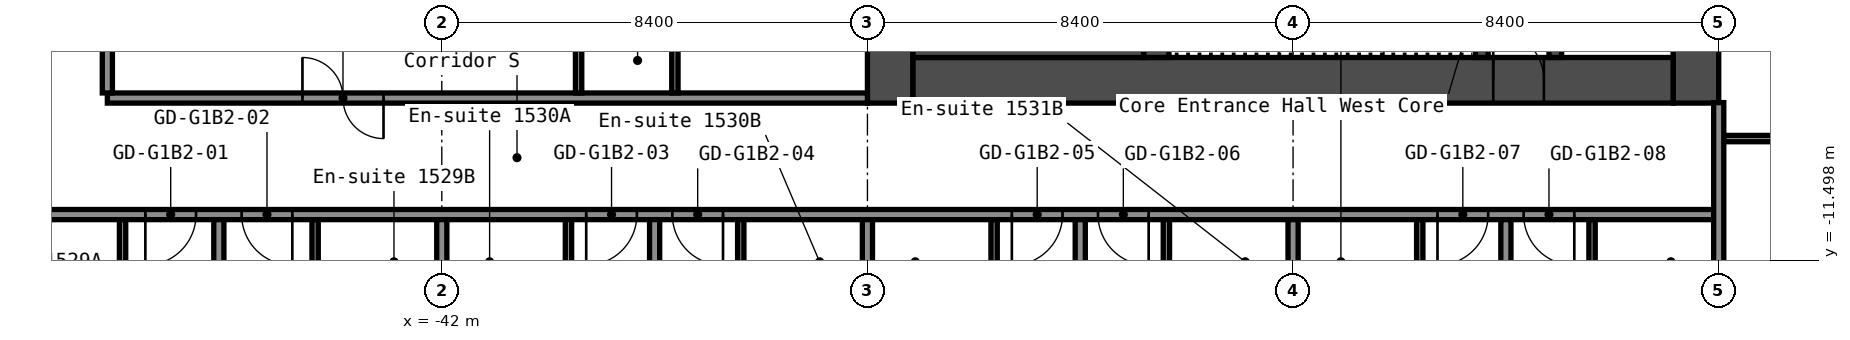
"""IFC4 building model, lengths in metres.
Left out: names, types, materials, properties, quantities, classifications, styles, units other than length and angle.
Written with IfcOpenShell. Run it as: python <this file> out.ifc"""

import sys

from ifc_helpers import new_model, si_unit, direction, frame, frame_2d, origin, place, context, subcontext, project, spatial, rectangle, extrude, element, fill, save


model = new_model("IFC4")
c1 = context("Model", 3, precision=1e-05, world=origin(), true_north=direction((0.0, 1.0)))
c2 = subcontext(c1, "Body", "Model", "MODEL_VIEW")
j1 = project(units=[si_unit("LENGTHUNIT", "METRE"), si_unit("PLANEANGLEUNIT", "RADIAN")], contexts=[c1])
p1 = place(None, origin())
s1 = spatial("IfcSite", under=j1, at=p1, CompositionType="ELEMENT")
p2 = place(p1, origin())
s2 = spatial("IfcBuilding", under=s1, at=p2, CompositionType="ELEMENT")
p3 = place(p2, frame((0.0, 0.0, 55.0)))
s3 = spatial("IfcBuildingStorey", under=s2, at=p3, CompositionType="ELEMENT", Elevation=55.0)
p4 = place(p3, frame((-17.25, -8.4, 0.0), z_axis=(0.0, 0.0, 1.0), x_axis=(0.0, 1.0, 0.0)))
e1 = element("IfcWall", 1, at=p4, inside=s3, PredefinedType="SHEAR", context=c2, shape_type="SweptSolid", body=[
    extrude(rectangle(XDim=16.8, YDim=0.9, at=frame_2d((8.4, 0.0))), origin(), (0.0, 0.0, 1.0), 2.8),
])
p5 = place(p4, frame((12.75, 0.0, 0.0)))
e2 = element("IfcOpeningElement", 2, at=p5, cuts=e1, PredefinedType="OPENING", context=c2, shape_type="SweptSolid", body=[
    extrude(rectangle(XDim=1.2, YDim=2.1, at=frame_2d((0.6, 1.05))), frame((0.0, 0.46, 0.0), z_axis=(0.0, -1.0, 0.0), x_axis=(1.0, 0.0, 0.0)), (0.0, 0.0, 1.0), 0.92),
])
p6 = place(p4, frame((2.85, 0.0, 0.0)))
e3 = element("IfcOpeningElement", 3, at=p6, cuts=e1, PredefinedType="OPENING", context=c2, shape_type="SweptSolid", body=[
    extrude(rectangle(XDim=1.2, YDim=2.1, at=frame_2d((0.6, 1.05))), frame((0.0, 0.46, 0.0), z_axis=(0.0, -1.0, 0.0), x_axis=(1.0, 0.0, 0.0)), (0.0, 0.0, 1.0), 0.92),
])
p7 = place(p3, frame((-33.15, -8.4, 0.0), z_axis=(0.0, 0.0, 1.0), x_axis=(0.0, 1.0, 0.0)))
e4 = element("IfcWall", 4, at=p7, inside=s3, PredefinedType="SHEAR", context=c2, shape_type="SweptSolid", body=[
    extrude(rectangle(XDim=16.8, YDim=0.9, at=frame_2d((8.4, 0.0))), origin(), (0.0, 0.0, 1.0), 2.8),
])
p8 = place(p3, frame((-32.7, -7.95, 0.0), z_axis=(0.0, 0.0, 1.0), x_axis=(1.0, 0.0, 0.0)))
e5 = element("IfcWall", 5, at=p8, inside=s3, PredefinedType="SHEAR", context=c2, shape_type="SweptSolid", body=[
    extrude(rectangle(XDim=15.0, YDim=0.9, at=frame_2d((7.5, 0.0))), origin(), (0.0, 0.0, 1.0), 2.8),
])
p9 = place(p8, frame((11.45, 0.0, 0.0)))
e6 = element("IfcOpeningElement", 6, at=p9, cuts=e5, PredefinedType="OPENING", context=c2, shape_type="SweptSolid", body=[
    extrude(rectangle(XDim=1.0, YDim=2.1, at=frame_2d((0.5, 1.05))), frame((0.0, 0.46, 0.0), z_axis=(0.0, -1.0, 0.0), x_axis=(1.0, 0.0, 0.0)), (0.0, 0.0, 1.0), 0.92),
])
p10 = place(p3, frame((-20.025, -7.5, 0.0), z_axis=(0.0, 0.0, 1.0), x_axis=(0.0, 1.0, 0.0)))
e7 = element("IfcWall", 7, at=p10, inside=s3, PredefinedType="SHEAR", context=c2, shape_type="SweptSolid", body=[
    extrude(rectangle(XDim=6.3, YDim=0.25, at=frame_2d((3.15, 0.0))), origin(), (0.0, 0.0, 1.0), 2.8),
])
p11 = place(p10, frame((2.4, 0.0, 0.0)))
e8 = element("IfcOpeningElement", 8, at=p11, cuts=e7, PredefinedType="OPENING", context=c2, shape_type="SweptSolid", body=[
    extrude(rectangle(XDim=1.0, YDim=2.1, at=frame_2d((0.5, 1.05))), frame((0.0, 0.135, 0.0), z_axis=(0.0, -1.0, 0.0), x_axis=(1.0, 0.0, 0.0)), (0.0, 0.0, 1.0), 0.27),
])
p12 = place(p3, frame((-21.475, -7.5, 0.0), z_axis=(0.0, 0.0, 1.0), x_axis=(0.0, 1.0, 0.0)))
e9 = element("IfcWall", 9, at=p12, inside=s3, PredefinedType="SHEAR", context=c2, shape_type="SweptSolid", body=[
    extrude(rectangle(XDim=3.75, YDim=0.25, at=frame_2d((1.875, 0.0))), origin(), (0.0, 0.0, 1.0), 2.8),
])
p13 = place(p12, frame((1.3, 0.0, 0.0)))
e10 = element("IfcOpeningElement", 10, at=p13, cuts=e9, PredefinedType="OPENING", context=c2, shape_type="SweptSolid", body=[
    extrude(rectangle(XDim=1.2, YDim=2.1, at=frame_2d((0.6, 1.05))), frame((0.0, 0.135, 0.0), z_axis=(0.0, -1.0, 0.0), x_axis=(1.0, 0.0, 0.0)), (0.0, 0.0, 1.0), 0.27),
])
p14 = place(p3, frame((-27.9, -7.5, 0.0), z_axis=(0.0, 0.0, 1.0), x_axis=(0.0, 1.0, 0.0)))
e11 = element("IfcWall", 11, at=p14, inside=s3, PredefinedType="SHEAR", context=c2, shape_type="SweptSolid", body=[
    extrude(rectangle(XDim=3.75, YDim=0.5, at=frame_2d((1.875, 0.0))), origin(), (0.0, 0.0, 1.0), 2.8),
])
p15 = place(p3, frame((-32.7, -6.75, 0.0), z_axis=(0.0, 0.0, 1.0), x_axis=(1.0, 0.0, 0.0)))
e12 = element("IfcWall", 12, at=p15, inside=s3, PredefinedType="SHEAR", context=c2, shape_type="SweptSolid", body=[
    extrude(rectangle(XDim=4.55, YDim=1.5, at=frame_2d((2.275, 0.0))), origin(), (0.0, 0.0, 1.0), 2.8),
])
p16 = place(p3, frame((-51.1, -10.6, 0.0), z_axis=(0.0, 0.0, 1.0), x_axis=(1.0, 0.0, 0.0)))
e13 = element("IfcWall", 13, at=p16, inside=s3, PredefinedType="PARTITIONING", context=c2, shape_type="SweptSolid", body=[
    extrude(rectangle(XDim=34.3, YDim=0.2, at=frame_2d((17.15, 0.0))), origin(), (0.0, 0.0, 1.0), 2.8),
])
p17 = place(p16, frame((3.25, 0.0, 0.0)))
e14 = element("IfcOpeningElement", 14, at=p17, cuts=e13, PredefinedType="OPENING", context=c2, shape_type="SweptSolid", body=[
    extrude(rectangle(XDim=1.0, YDim=2.1, at=frame_2d((0.5, 1.05))), frame((0.0, 0.11, 0.0), z_axis=(0.0, -1.0, 0.0), x_axis=(1.0, 0.0, 0.0)), (0.0, 0.0, 1.0), 0.22),
])
p18 = place(p16, frame((5.15, 0.0, 0.0)))
e15 = element("IfcOpeningElement", 15, at=p18, cuts=e13, PredefinedType="OPENING", context=c2, shape_type="SweptSolid", body=[
    extrude(rectangle(XDim=1.0, YDim=2.1, at=frame_2d((0.5, 1.05))), frame((0.0, 0.11, 0.0), z_axis=(0.0, -1.0, 0.0), x_axis=(1.0, 0.0, 0.0)), (0.0, 0.0, 1.0), 0.22),
])
p19 = place(p16, frame((11.95, 0.0, 0.0)))
e16 = element("IfcOpeningElement", 16, at=p19, cuts=e13, PredefinedType="OPENING", context=c2, shape_type="SweptSolid", body=[
    extrude(rectangle(XDim=1.0, YDim=2.1, at=frame_2d((0.5, 1.05))), frame((0.0, 0.11, 0.0), z_axis=(0.0, -1.0, 0.0), x_axis=(1.0, 0.0, 0.0)), (0.0, 0.0, 1.0), 0.22),
])
p20 = place(p16, frame((13.65, 0.0, 0.0)))
e17 = element("IfcOpeningElement", 17, at=p20, cuts=e13, PredefinedType="OPENING", context=c2, shape_type="SweptSolid", body=[
    extrude(rectangle(XDim=1.0, YDim=2.1, at=frame_2d((0.5, 1.05))), frame((0.0, 0.11, 0.0), z_axis=(0.0, -1.0, 0.0), x_axis=(1.0, 0.0, 0.0)), (0.0, 0.0, 1.0), 0.22),
])
p21 = place(p16, frame((20.35, 0.0, 0.0)))
e18 = element("IfcOpeningElement", 18, at=p21, cuts=e13, PredefinedType="OPENING", context=c2, shape_type="SweptSolid", body=[
    extrude(rectangle(XDim=1.0, YDim=2.1, at=frame_2d((0.5, 1.05))), frame((0.0, 0.11, 0.0), z_axis=(0.0, -1.0, 0.0), x_axis=(1.0, 0.0, 0.0)), (0.0, 0.0, 1.0), 0.22),
])
p22 = place(p16, frame((22.05, 0.0, 0.0)))
e19 = element("IfcOpeningElement", 19, at=p22, cuts=e13, PredefinedType="OPENING", context=c2, shape_type="SweptSolid", body=[
    extrude(rectangle(XDim=1.0, YDim=2.1, at=frame_2d((0.5, 1.05))), frame((0.0, 0.11, 0.0), z_axis=(0.0, -1.0, 0.0), x_axis=(1.0, 0.0, 0.0)), (0.0, 0.0, 1.0), 0.22),
])
p23 = place(p16, frame((28.75, 0.0, 0.0)))
e20 = element("IfcOpeningElement", 20, at=p23, cuts=e13, PredefinedType="OPENING", context=c2, shape_type="SweptSolid", body=[
    extrude(rectangle(XDim=1.0, YDim=2.1, at=frame_2d((0.5, 1.05))), frame((0.0, 0.11, 0.0), z_axis=(0.0, -1.0, 0.0), x_axis=(1.0, 0.0, 0.0)), (0.0, 0.0, 1.0), 0.22),
])
p24 = place(p16, frame((30.45, 0.0, 0.0)))
e21 = element("IfcOpeningElement", 21, at=p24, cuts=e13, PredefinedType="OPENING", context=c2, shape_type="SweptSolid", body=[
    extrude(rectangle(XDim=1.0, YDim=2.1, at=frame_2d((0.5, 1.05))), frame((0.0, 0.11, 0.0), z_axis=(0.0, -1.0, 0.0), x_axis=(1.0, 0.0, 0.0)), (0.0, 0.0, 1.0), 0.22),
])
p25 = place(p3, frame((-16.7, -9.1, 0.0), z_axis=(0.0, 0.0, 1.0), x_axis=(1.0, 0.0, 0.0)))
e22 = element("IfcWall", 22, at=p25, inside=s3, PredefinedType="PARTITIONING", context=c2, shape_type="SweptSolid", body=[
    extrude(rectangle(XDim=2.337, YDim=0.125, at=frame_2d((1.169, 0.0))), origin(), (0.0, 0.0, 1.0), 2.8),
])
p26 = place(p3, frame((-48.6, -8.3, 0.0), z_axis=(0.0, 0.0, 1.0), x_axis=(1.0, 0.0, 0.0)))
e23 = element("IfcWall", 23, at=p26, inside=s3, PredefinedType="PARTITIONING", context=c2, shape_type="SweptSolid", body=[
    extrude(rectangle(XDim=15.0, YDim=0.2, at=frame_2d((7.5, 0.0))), origin(), (0.0, 0.0, 1.0), 2.8),
])
p27 = place(p26, frame((3.85, 0.0, 0.0)))
e24 = element("IfcOpeningElement", 24, at=p27, cuts=e23, PredefinedType="OPENING", context=c2, shape_type="SweptSolid", body=[
    extrude(rectangle(XDim=1.6, YDim=2.1, at=frame_2d((0.8, 1.05))), frame((0.0, 0.11, 0.0), z_axis=(0.0, -1.0, 0.0), x_axis=(1.0, 0.0, 0.0)), (0.0, 0.0, 1.0), 0.22),
])
p28 = place(p3, frame((-48.6, -8.2, 0.0), z_axis=(0.0, 0.0, 1.0), x_axis=(0.0, 1.0, 0.0)))
e25 = element("IfcWall", 25, at=p28, inside=s3, PredefinedType="PARTITIONING", context=c2, shape_type="SweptSolid", body=[
    extrude(rectangle(XDim=16.4, YDim=0.2, at=frame_2d((8.2, 0.0))), origin(), (0.0, 0.0, 1.0), 2.8),
])
p29 = place(p3, frame((-48.3, -13.6, 0.0), z_axis=(0.0, 0.0, 1.0), x_axis=(0.0, 1.0, 0.0)))
e26 = element("IfcWall", 26, at=p29, inside=s3, PredefinedType="PARTITIONING", context=c2, shape_type="SweptSolid", body=[
    extrude(rectangle(XDim=2.9, YDim=0.125, at=frame_2d((1.45, 0.0))), origin(), (0.0, 0.0, 1.0), 2.8),
])
p30 = place(p29, frame((0.6, 0.0, 0.0)))
e27 = element("IfcOpeningElement", 27, at=p30, cuts=e26, PredefinedType="OPENING", context=c2, shape_type="SweptSolid", body=[
    extrude(rectangle(XDim=0.8, YDim=2.1, at=frame_2d((0.4, 1.05))), frame((0.0, 0.073, 0.0), z_axis=(0.0, -1.0, 0.0), x_axis=(1.0, 0.0, 0.0)), (0.0, 0.0, 1.0), 0.145),
])
p31 = place(p3, frame((-46.4, -20.3, 0.0), z_axis=(0.0, 0.0, 1.0), x_axis=(0.0, 1.0, 0.0)))
e28 = element("IfcWall", 28, at=p31, inside=s3, PredefinedType="PARTITIONING", context=c2, shape_type="SweptSolid", body=[
    extrude(rectangle(XDim=9.6, YDim=0.2, at=frame_2d((4.8, 0.0))), origin(), (0.0, 0.0, 1.0), 2.8),
])
p32 = place(p3, frame((-44.5, -13.6, 0.0), z_axis=(0.0, 0.0, 1.0), x_axis=(0.0, 1.0, 0.0)))
e29 = element("IfcWall", 29, at=p32, inside=s3, PredefinedType="PARTITIONING", context=c2, shape_type="SweptSolid", body=[
    extrude(rectangle(XDim=2.9, YDim=0.125, at=frame_2d((1.45, 0.0))), origin(), (0.0, 0.0, 1.0), 2.8),
])
p33 = place(p32, frame((0.6, 0.0, 0.0)))
e30 = element("IfcOpeningElement", 30, at=p33, cuts=e29, PredefinedType="OPENING", context=c2, shape_type="SweptSolid", body=[
    extrude(rectangle(XDim=0.8, YDim=2.1, at=frame_2d((0.4, 1.05))), frame((0.0, 0.073, 0.0), z_axis=(0.0, -1.0, 0.0), x_axis=(1.0, 0.0, 0.0)), (0.0, 0.0, 1.0), 0.145),
])
p34 = place(p3, frame((-42.0, -20.3, 0.0), z_axis=(0.0, 0.0, 1.0), x_axis=(0.0, 1.0, 0.0)))
e31 = element("IfcWall", 31, at=p34, inside=s3, PredefinedType="PARTITIONING", context=c2, shape_type="SweptSolid", body=[
    extrude(rectangle(XDim=9.6, YDim=0.2, at=frame_2d((4.8, 0.0))), origin(), (0.0, 0.0, 1.0), 2.8),
])
p35 = place(p3, frame((-39.5, -13.6, 0.0), z_axis=(0.0, 0.0, 1.0), x_axis=(0.0, 1.0, 0.0)))
e32 = element("IfcWall", 32, at=p35, inside=s3, PredefinedType="PARTITIONING", context=c2, shape_type="SweptSolid", body=[
    extrude(rectangle(XDim=2.9, YDim=0.125, at=frame_2d((1.45, 0.0))), origin(), (0.0, 0.0, 1.0), 2.8),
])
p36 = place(p35, frame((0.6, 0.0, 0.0)))
e33 = element("IfcOpeningElement", 33, at=p36, cuts=e32, PredefinedType="OPENING", context=c2, shape_type="SweptSolid", body=[
    extrude(rectangle(XDim=0.8, YDim=2.1, at=frame_2d((0.4, 1.05))), frame((0.0, 0.073, 0.0), z_axis=(0.0, -1.0, 0.0), x_axis=(1.0, 0.0, 0.0)), (0.0, 0.0, 1.0), 0.145),
])
p37 = place(p3, frame((-39.3, -8.2, 0.0), z_axis=(0.0, 0.0, 1.0), x_axis=(0.0, 1.0, 0.0)))
e34 = element("IfcWall", 34, at=p37, inside=s3, PredefinedType="PARTITIONING", context=c2, shape_type="SweptSolid", body=[
    extrude(rectangle(XDim=2.3, YDim=0.125, at=frame_2d((1.15, 0.0))), origin(), (0.0, 0.0, 1.0), 2.8),
])
p38 = place(p3, frame((-37.8, -20.3, 0.0), z_axis=(0.0, 0.0, 1.0), x_axis=(0.0, 1.0, 0.0)))
e35 = element("IfcWall", 35, at=p38, inside=s3, PredefinedType="PARTITIONING", context=c2, shape_type="SweptSolid", body=[
    extrude(rectangle(XDim=9.6, YDim=0.2, at=frame_2d((4.8, 0.0))), origin(), (0.0, 0.0, 1.0), 2.8),
])
p39 = place(p3, frame((-37.4, -8.2, 0.0), z_axis=(0.0, 0.0, 1.0), x_axis=(0.0, 1.0, 0.0)))
e36 = element("IfcWall", 36, at=p39, inside=s3, PredefinedType="PARTITIONING", context=c2, shape_type="SweptSolid", body=[
    extrude(rectangle(XDim=3.3, YDim=0.125, at=frame_2d((1.65, 0.0))), origin(), (0.0, 0.0, 1.0), 2.8),
])
p40 = place(p3, frame((-36.1, -13.6, 0.0), z_axis=(0.0, 0.0, 1.0), x_axis=(0.0, 1.0, 0.0)))
e37 = element("IfcWall", 37, at=p40, inside=s3, PredefinedType="PARTITIONING", context=c2, shape_type="SweptSolid", body=[
    extrude(rectangle(XDim=2.9, YDim=0.125, at=frame_2d((1.45, 0.0))), origin(), (0.0, 0.0, 1.0), 2.8),
])
p41 = place(p40, frame((0.6, 0.0, 0.0)))
e38 = element("IfcOpeningElement", 38, at=p41, cuts=e37, PredefinedType="OPENING", context=c2, shape_type="SweptSolid", body=[
    extrude(rectangle(XDim=0.8, YDim=2.1, at=frame_2d((0.4, 1.05))), frame((0.0, 0.073, 0.0), z_axis=(0.0, -1.0, 0.0), x_axis=(1.0, 0.0, 0.0)), (0.0, 0.0, 1.0), 0.145),
])
p42 = place(p3, frame((-33.6, -20.3, 0.0), z_axis=(0.0, 0.0, 1.0), x_axis=(0.0, 1.0, 0.0)))
e39 = element("IfcWall", 39, at=p42, inside=s3, PredefinedType="PARTITIONING", context=c2, shape_type="SweptSolid", body=[
    extrude(rectangle(XDim=9.6, YDim=0.2, at=frame_2d((4.8, 0.0))), origin(), (0.0, 0.0, 1.0), 2.8),
])
p43 = place(p3, frame((-31.1, -13.6, 0.0), z_axis=(0.0, 0.0, 1.0), x_axis=(0.0, 1.0, 0.0)))
e40 = element("IfcWall", 40, at=p43, inside=s3, PredefinedType="PARTITIONING", context=c2, shape_type="SweptSolid", body=[
    extrude(rectangle(XDim=2.9, YDim=0.125, at=frame_2d((1.45, 0.0))), origin(), (0.0, 0.0, 1.0), 2.8),
])
p44 = place(p43, frame((0.6, 0.0, 0.0)))
e41 = element("IfcOpeningElement", 41, at=p44, cuts=e40, PredefinedType="OPENING", context=c2, shape_type="SweptSolid", body=[
    extrude(rectangle(XDim=0.8, YDim=2.1, at=frame_2d((0.4, 1.05))), frame((0.0, 0.073, 0.0), z_axis=(0.0, -1.0, 0.0), x_axis=(1.0, 0.0, 0.0)), (0.0, 0.0, 1.0), 0.145),
])
p45 = place(p3, frame((-29.4, -20.3, 0.0), z_axis=(0.0, 0.0, 1.0), x_axis=(0.0, 1.0, 0.0)))
e42 = element("IfcWall", 42, at=p45, inside=s3, PredefinedType="PARTITIONING", context=c2, shape_type="SweptSolid", body=[
    extrude(rectangle(XDim=9.6, YDim=0.2, at=frame_2d((4.8, 0.0))), origin(), (0.0, 0.0, 1.0), 2.8),
])
p46 = place(p3, frame((-27.7, -13.6, 0.0), z_axis=(0.0, 0.0, 1.0), x_axis=(0.0, 1.0, 0.0)))
e43 = element("IfcWall", 43, at=p46, inside=s3, PredefinedType="PARTITIONING", context=c2, shape_type="SweptSolid", body=[
    extrude(rectangle(XDim=2.9, YDim=0.125, at=frame_2d((1.45, 0.0))), origin(), (0.0, 0.0, 1.0), 2.8),
])
p47 = place(p46, frame((0.6, 0.0, 0.0)))
e44 = element("IfcOpeningElement", 44, at=p47, cuts=e43, PredefinedType="OPENING", context=c2, shape_type="SweptSolid", body=[
    extrude(rectangle(XDim=0.8, YDim=2.1, at=frame_2d((0.4, 1.05))), frame((0.0, 0.073, 0.0), z_axis=(0.0, -1.0, 0.0), x_axis=(1.0, 0.0, 0.0)), (0.0, 0.0, 1.0), 0.145),
])
p48 = place(p3, frame((-25.2, -20.3, 0.0), z_axis=(0.0, 0.0, 1.0), x_axis=(0.0, 1.0, 0.0)))
e45 = element("IfcWall", 45, at=p48, inside=s3, PredefinedType="PARTITIONING", context=c2, shape_type="SweptSolid", body=[
    extrude(rectangle(XDim=9.6, YDim=0.2, at=frame_2d((4.8, 0.0))), origin(), (0.0, 0.0, 1.0), 2.8),
])
p49 = place(p3, frame((-22.7, -13.6, 0.0), z_axis=(0.0, 0.0, 1.0), x_axis=(0.0, 1.0, 0.0)))
e46 = element("IfcWall", 46, at=p49, inside=s3, PredefinedType="PARTITIONING", context=c2, shape_type="SweptSolid", body=[
    extrude(rectangle(XDim=2.9, YDim=0.125, at=frame_2d((1.45, 0.0))), origin(), (0.0, 0.0, 1.0), 2.8),
])
p50 = place(p49, frame((0.6, 0.0, 0.0)))
e47 = element("IfcOpeningElement", 47, at=p50, cuts=e46, PredefinedType="OPENING", context=c2, shape_type="SweptSolid", body=[
    extrude(rectangle(XDim=0.8, YDim=2.1, at=frame_2d((0.4, 1.05))), frame((0.0, 0.073, 0.0), z_axis=(0.0, -1.0, 0.0), x_axis=(1.0, 0.0, 0.0)), (0.0, 0.0, 1.0), 0.145),
])
p51 = place(p3, frame((-21.0, -20.3, 0.0), z_axis=(0.0, 0.0, 1.0), x_axis=(0.0, 1.0, 0.0)))
e48 = element("IfcWall", 48, at=p51, inside=s3, PredefinedType="PARTITIONING", context=c2, shape_type="SweptSolid", body=[
    extrude(rectangle(XDim=9.6, YDim=0.2, at=frame_2d((4.8, 0.0))), origin(), (0.0, 0.0, 1.0), 2.8),
])
p52 = place(p3, frame((-19.3, -13.6, 0.0), z_axis=(0.0, 0.0, 1.0), x_axis=(0.0, 1.0, 0.0)))
e49 = element("IfcWall", 49, at=p52, inside=s3, PredefinedType="PARTITIONING", context=c2, shape_type="SweptSolid", body=[
    extrude(rectangle(XDim=2.9, YDim=0.125, at=frame_2d((1.45, 0.0))), origin(), (0.0, 0.0, 1.0), 2.8),
])
p53 = place(p52, frame((0.6, 0.0, 0.0)))
e50 = element("IfcOpeningElement", 50, at=p53, cuts=e49, PredefinedType="OPENING", context=c2, shape_type="SweptSolid", body=[
    extrude(rectangle(XDim=0.8, YDim=2.1, at=frame_2d((0.4, 1.05))), frame((0.0, 0.073, 0.0), z_axis=(0.0, -1.0, 0.0), x_axis=(1.0, 0.0, 0.0)), (0.0, 0.0, 1.0), 0.145),
])
p54 = place(p3, frame((-16.8, -20.3, 0.0), z_axis=(0.0, 0.0, 1.0), x_axis=(0.0, 1.0, 0.0)))
e51 = element("IfcWall", 51, at=p54, inside=s3, PredefinedType="PARTITIONING", context=c2, shape_type="SweptSolid", body=[
    extrude(rectangle(XDim=11.91, YDim=0.2, at=frame_2d((5.955, 0.0))), origin(), (0.0, 0.0, 1.0), 2.8),
])
p55 = place(p9, origin())
e52 = element("IfcDoor", 52, at=p55, inside=s3, OperationType="SINGLE_SWING_RIGHT", PredefinedType="DOOR", context=c2, shape_type="SweptSolid", body=[
    extrude(rectangle(XDim=1.0, YDim=2.1, at=frame_2d((0.5, 1.05))), frame((0.0, 0.025, 0.0), z_axis=(0.0, -1.0, 0.0), x_axis=(1.0, 0.0, 0.0)), (0.0, 0.0, 1.0), 0.05),
])
fill(e6, e52)
p56 = place(p17, origin())
e53 = element("IfcDoor", 53, at=p56, inside=s3, OperationType="SINGLE_SWING_LEFT", PredefinedType="DOOR", context=c2, shape_type="SweptSolid", body=[
    extrude(rectangle(XDim=1.0, YDim=2.1, at=frame_2d((0.5, 1.05))), frame((0.0, 0.025, 0.0), z_axis=(0.0, -1.0, 0.0), x_axis=(1.0, 0.0, 0.0)), (0.0, 0.0, 1.0), 0.05),
])
fill(e14, e53)
p57 = place(p18, origin())
e54 = element("IfcDoor", 54, at=p57, inside=s3, OperationType="SINGLE_SWING_RIGHT", PredefinedType="DOOR", context=c2, shape_type="SweptSolid", body=[
    extrude(rectangle(XDim=1.0, YDim=2.1, at=frame_2d((0.5, 1.05))), frame((0.0, 0.025, 0.0), z_axis=(0.0, -1.0, 0.0), x_axis=(1.0, 0.0, 0.0)), (0.0, 0.0, 1.0), 0.05),
])
fill(e15, e54)
p58 = place(p19, origin())
e55 = element("IfcDoor", 55, at=p58, inside=s3, OperationType="SINGLE_SWING_LEFT", PredefinedType="DOOR", context=c2, shape_type="SweptSolid", body=[
    extrude(rectangle(XDim=1.0, YDim=2.1, at=frame_2d((0.5, 1.05))), frame((0.0, 0.025, 0.0), z_axis=(0.0, -1.0, 0.0), x_axis=(1.0, 0.0, 0.0)), (0.0, 0.0, 1.0), 0.05),
])
fill(e16, e55)
p59 = place(p20, origin())
e56 = element("IfcDoor", 56, at=p59, inside=s3, OperationType="SINGLE_SWING_RIGHT", PredefinedType="DOOR", context=c2, shape_type="SweptSolid", body=[
    extrude(rectangle(XDim=1.0, YDim=2.1, at=frame_2d((0.5, 1.05))), frame((0.0, 0.025, 0.0), z_axis=(0.0, -1.0, 0.0), x_axis=(1.0, 0.0, 0.0)), (0.0, 0.0, 1.0), 0.05),
])
fill(e17, e56)
p60 = place(p21, origin())
e57 = element("IfcDoor", 57, at=p60, inside=s3, OperationType="SINGLE_SWING_LEFT", PredefinedType="DOOR", context=c2, shape_type="SweptSolid", body=[
    extrude(rectangle(XDim=1.0, YDim=2.1, at=frame_2d((0.5, 1.05))), frame((0.0, 0.025, 0.0), z_axis=(0.0, -1.0, 0.0), x_axis=(1.0, 0.0, 0.0)), (0.0, 0.0, 1.0), 0.05),
])
fill(e18, e57)
p61 = place(p22, origin())
e58 = element("IfcDoor", 58, at=p61, inside=s3, OperationType="SINGLE_SWING_RIGHT", PredefinedType="DOOR", context=c2, shape_type="SweptSolid", body=[
    extrude(rectangle(XDim=1.0, YDim=2.1, at=frame_2d((0.5, 1.05))), frame((0.0, 0.025, 0.0), z_axis=(0.0, -1.0, 0.0), x_axis=(1.0, 0.0, 0.0)), (0.0, 0.0, 1.0), 0.05),
])
fill(e19, e58)
p62 = place(p23, origin())
e59 = element("IfcDoor", 59, at=p62, inside=s3, OperationType="SINGLE_SWING_LEFT", PredefinedType="DOOR", context=c2, shape_type="SweptSolid", body=[
    extrude(rectangle(XDim=1.0, YDim=2.1, at=frame_2d((0.5, 1.05))), frame((0.0, 0.025, 0.0), z_axis=(0.0, -1.0, 0.0), x_axis=(1.0, 0.0, 0.0)), (0.0, 0.0, 1.0), 0.05),
])
fill(e20, e59)
p63 = place(p24, origin())
e60 = element("IfcDoor", 60, at=p63, inside=s3, OperationType="SINGLE_SWING_RIGHT", PredefinedType="DOOR", context=c2, shape_type="SweptSolid", body=[
    extrude(rectangle(XDim=1.0, YDim=2.1, at=frame_2d((0.5, 1.05))), frame((0.0, 0.025, 0.0), z_axis=(0.0, -1.0, 0.0), x_axis=(1.0, 0.0, 0.0)), (0.0, 0.0, 1.0), 0.05),
])
fill(e21, e60)
p64 = place(p27, origin())
e61 = element("IfcDoor", 61, at=p64, inside=s3, OperationType="DOUBLE_DOOR_SINGLE_SWING", PredefinedType="DOOR", context=c2, shape_type="SweptSolid", body=[
    extrude(rectangle(XDim=1.6, YDim=2.1, at=frame_2d((0.8, 1.05))), frame((0.0, 0.025, 0.0), z_axis=(0.0, -1.0, 0.0), x_axis=(1.0, 0.0, 0.0)), (0.0, 0.0, 1.0), 0.05),
])
fill(e24, e61)
save(model, sys.argv[1])
